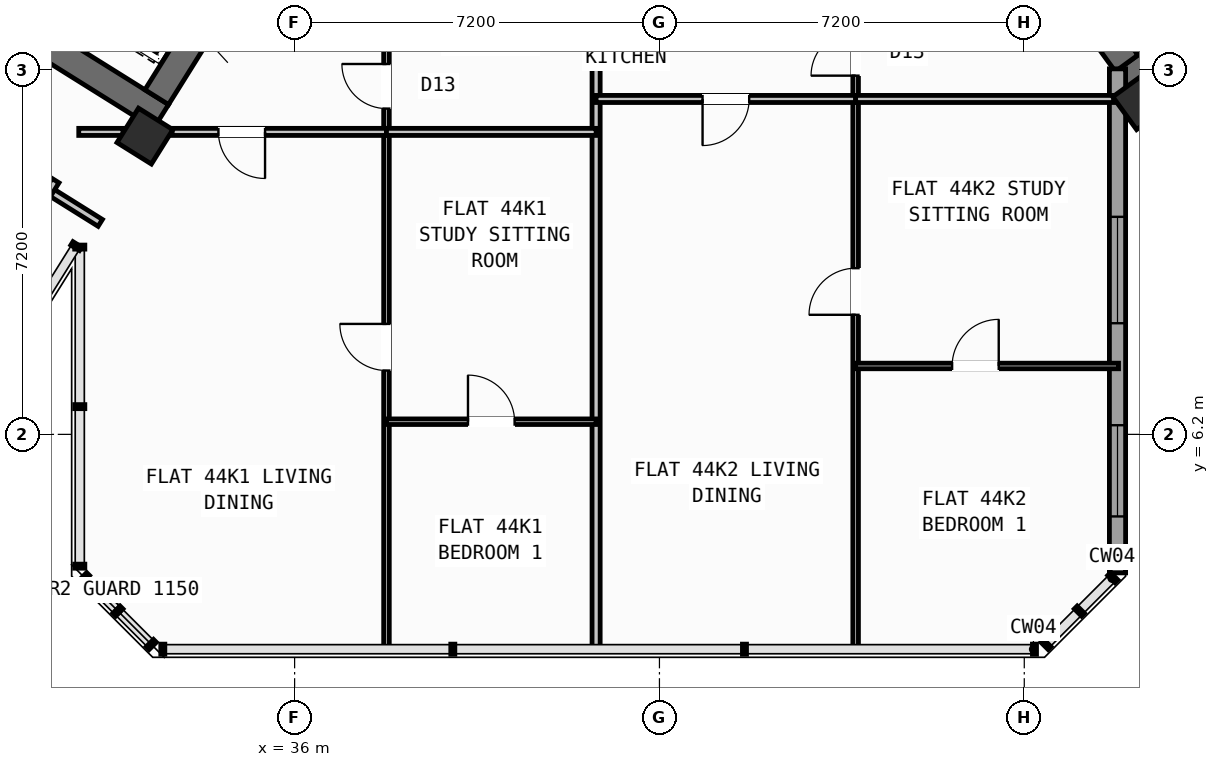
"""IFC4 building model, lengths in metres.
Left out: names, types, materials, properties, quantities, classifications, styles, units other than length and angle.
Written with IfcOpenShell. Run it as: python <this file> out.ifc"""

import sys

from ifc_helpers import new_model, si_unit, direction, frame, frame_2d, origin, origin_2d, place, context, subcontext, project, spatial, rectangle, hollow_rectangle, extrude, source, transform, mapped, element, fill, save


model = new_model("IFC4")
c1 = context("Model", 3, precision=1e-05, world=origin(), true_north=direction((0.0, 1.0)))
c2 = subcontext(c1, "Body", "Model", "MODEL_VIEW")
j1 = project(units=[si_unit("LENGTHUNIT", "METRE"), si_unit("PLANEANGLEUNIT", "RADIAN")], contexts=[c1])
p1 = place(None, origin())
s1 = spatial("IfcSite", under=j1, at=p1, CompositionType="ELEMENT")
p2 = place(p1, origin())
s2 = spatial("IfcBuilding", under=s1, at=p2, CompositionType="ELEMENT")
p3 = place(p2, frame((0.0, 0.0, 174.9)))
s3 = spatial("IfcBuildingStorey", under=s2, at=p3, CompositionType="ELEMENT", Elevation=174.9)
p4 = place(p3, frame((33.366, 12.477, 0.0), z_axis=(0.0, 0.0, 1.0), x_axis=(-0.848047359947, 0.529920442413, 0.0)))
e1 = element("IfcWall", 1, at=p4, inside=s3, PredefinedType="SHEAR", context=c2, shape_type="SweptSolid", body=[
    extrude(rectangle(XDim=13.14, YDim=0.55, at=frame_2d((6.57, 0.0))), origin(), (0.0, 0.0, 1.0), 4.22),
])
p5 = place(p3, frame((36.683, 18.304, 0.0), z_axis=(0.0, 0.0, 1.0), x_axis=(-0.529896466841, -0.848062341122, 0.0)))
e2 = element("IfcWall", 2, at=p5, inside=s3, PredefinedType="SHEAR", context=c2, shape_type="SweptSolid", body=[
    extrude(rectangle(XDim=6.425, YDim=0.55, at=frame_2d((3.212, 0.0))), origin(), (0.0, 0.0, 1.0), 4.22),
])
p6 = place(p3, frame((52.359, 13.14, 0.0), z_axis=(0.0, 0.0, 1.0), x_axis=(0.809014896919, 0.587788139183, 0.0)))
e3 = element("IfcWall", 3, at=p6, inside=s3, PredefinedType="SHEAR", context=c2, shape_type="SweptSolid", body=[
    extrude(rectangle(XDim=12.34, YDim=0.55, at=frame_2d((6.17, 0.0))), origin(), (0.0, 0.0, 1.0), 4.22),
])
p7 = place(p3, frame((52.42, 13.524, 0.0), z_axis=(0.0, 0.0, 1.0), x_axis=(-0.587802113096, 0.809004744015, 0.0)))
e4 = element("IfcWall", 4, at=p7, inside=s3, PredefinedType="SHEAR", context=c2, shape_type="SweptSolid", body=[
    extrude(rectangle(XDim=3.575, YDim=0.55, at=frame_2d((1.788, 0.0))), origin(), (0.0, 0.0, 1.0), 4.22),
])
m1 = source(origin(), c2, "Body", "SweptSolid", [
    extrude(hollow_rectangle(XDim=0.8, YDim=0.8, WallThickness=0.032, at=origin_2d()), origin(), (0.0, 0.0, 1.0), 4.5),
])
for number, where, z_axis, x_axis in (
    (5, (33.046, 12.087, 0.0), (0.0, 0.0, 1.0), (-0.848, 0.53, 0.0)),
    (6, (52.705, 12.773, 0.0), (0.0, 0.0, 1.0), (0.809, 0.588, 0.0)),
):
    element("IfcColumn", number, at=place(p3, frame(where, z_axis=z_axis, x_axis=x_axis)), inside=s3, PredefinedType="COLUMN", context=c2, shape_type="MappedRepresentation", body=[
        mapped(m1, transform((0.0, 0.0, 0.0), scale=1.0)),
    ])
p8 = place(p3, frame((56.581, 7.439, 0.0), z_axis=(0.0, 0.0, 1.0), x_axis=(-0.587771678454, 0.809026856172, 0.0)))
e7 = element("IfcWall", 7, at=p8, inside=s3, PredefinedType="STANDARD", context=c2, shape_type="SweptSolid", body=[
    extrude(rectangle(XDim=6.824, YDim=0.32, at=frame_2d((3.412, 0.0))), origin(), (0.0, 0.0, 1.0), 4.22),
])
p9 = place(p3, frame((52.24, 13.414, 0.0), z_axis=(0.0, 0.0, 1.0), x_axis=(0.0, -1.0, 0.0)))
e8 = element("IfcWall", 8, at=p9, inside=s3, PredefinedType="STANDARD", context=c2, shape_type="SweptSolid", body=[
    extrude(rectangle(XDim=9.948, YDim=0.32, at=frame_2d((4.974, 0.0))), origin(), (0.0, 0.0, 1.0), 4.22),
])
p10 = place(p9, frame((2.92, 0.0, 0.8)))
e9 = element("IfcOpeningElement", 9, at=p10, cuts=e8, PredefinedType="OPENING", context=c2, shape_type="SweptSolid", body=[
    extrude(rectangle(XDim=2.1, YDim=1.55, at=frame_2d((1.05, 0.775))), frame((0.0, 0.17, 0.0), z_axis=(0.0, -1.0, 0.0), x_axis=(1.0, 0.0, 0.0)), (0.0, 0.0, 1.0), 0.34),
])
p11 = place(p9, frame((7.033, 0.0, 0.85)))
e10 = element("IfcOpeningElement", 10, at=p11, cuts=e8, PredefinedType="OPENING", context=c2, shape_type="SweptSolid", body=[
    extrude(rectangle(XDim=1.8, YDim=1.5, at=frame_2d((0.9, 0.75))), frame((0.0, 0.17, 0.0), z_axis=(0.0, -1.0, 0.0), x_axis=(1.0, 0.0, 0.0)), (0.0, 0.0, 1.0), 0.34),
])
p12 = place(p3, frame((32.164, 10.374, 0.0), z_axis=(0.0, 0.0, 1.0), x_axis=(-0.848044107957, 0.529925646633, 0.0)))
e11 = element("IfcWall", 11, at=p12, inside=s3, PredefinedType="PARTITIONING", context=c2, shape_type="SweptSolid", body=[
    extrude(rectangle(XDim=15.57, YDim=0.16, at=frame_2d((7.785, 0.0))), origin(), (0.0, 0.0, 1.0), 4.21),
])
p13 = place(p12, frame((10.83, 0.0, 0.0)))
e12 = element("IfcOpeningElement", 12, at=p13, cuts=e11, PredefinedType="OPENING", context=c2, shape_type="SweptSolid", body=[
    extrude(rectangle(XDim=1.0, YDim=2.1, at=frame_2d((0.5, 1.05))), frame((0.0, 0.09, 0.0), z_axis=(0.0, -1.0, 0.0), x_axis=(1.0, 0.0, 0.0)), (0.0, 0.0, 1.0), 0.18),
])
p14 = place(p3, frame((31.282, 11.208, 0.0), z_axis=(0.0, 0.0, 1.0), x_axis=(-0.529938869374, -0.84803584519, 0.0)))
e13 = element("IfcWall", 13, at=p14, inside=s3, PredefinedType="PARTITIONING", context=c2, shape_type="SweptSolid", body=[
    extrude(rectangle(XDim=5.48, YDim=0.16, at=frame_2d((2.74, 0.0))), origin(), (0.0, 0.0, 1.0), 4.21),
])
p15 = place(p3, frame((41.95, 1.96, 0.0), z_axis=(0.0, 0.0, 1.0), x_axis=(0.0, 1.0, 0.0)))
e14 = element("IfcWall", 14, at=p15, inside=s3, PredefinedType="PARTITIONING", context=c2, shape_type="SweptSolid", body=[
    extrude(rectangle(XDim=13.46, YDim=0.16, at=frame_2d((6.73, 0.0))), origin(), (0.0, 0.0, 1.0), 4.21),
])
p16 = place(p3, frame((37.813, 1.96, 0.0), z_axis=(0.0, 0.0, 1.0), x_axis=(0.0, 1.0, 0.0)))
e15 = element("IfcWall", 15, at=p16, inside=s3, PredefinedType="PARTITIONING", context=c2, shape_type="SweptSolid", body=[
    extrude(rectangle(XDim=13.46, YDim=0.11, at=frame_2d((6.73, 0.0))), origin(), (0.0, 0.0, 1.0), 4.21),
])
p17 = place(p16, frame((5.5, 0.0, 0.0)))
e16 = element("IfcOpeningElement", 16, at=p17, cuts=e15, PredefinedType="OPENING", context=c2, shape_type="SweptSolid", body=[
    extrude(rectangle(XDim=0.92, YDim=2.08, at=frame_2d((0.46, 1.04))), frame((0.0, 0.065, 0.0), z_axis=(0.0, -1.0, 0.0), x_axis=(1.0, 0.0, 0.0)), (0.0, 0.0, 1.0), 0.13),
])
p18 = place(p16, frame((10.67, 0.0, 0.0)))
e17 = element("IfcOpeningElement", 17, at=p18, cuts=e15, PredefinedType="OPENING", context=c2, shape_type="SweptSolid", body=[
    extrude(rectangle(XDim=0.88, YDim=2.08, at=frame_2d((0.44, 1.04))), frame((0.0, 0.065, 0.0), z_axis=(0.0, -1.0, 0.0), x_axis=(1.0, 0.0, 0.0)), (0.0, 0.0, 1.0), 0.13),
])
p19 = place(p3, frame((31.74, 12.17, 0.0), z_axis=(0.0, 0.0, 1.0), x_axis=(1.0, 0.0, 0.0)))
e18 = element("IfcWall", 18, at=p19, inside=s3, PredefinedType="PLUMBINGWALL", context=c2, shape_type="SweptSolid", body=[
    extrude(rectangle(XDim=0.872, YDim=0.14, at=frame_2d((0.436, 0.0))), origin(), (0.0, 0.0, 1.0), 4.21),
])
p20 = place(p3, frame((33.584, 12.17, 0.0), z_axis=(0.0, 0.0, 1.0), x_axis=(1.0, 0.0, 0.0)))
e19 = element("IfcWall", 19, at=p20, inside=s3, PredefinedType="PLUMBINGWALL", context=c2, shape_type="SweptSolid", body=[
    extrude(rectangle(XDim=4.229, YDim=0.14, at=frame_2d((2.115, 0.0))), origin(), (0.0, 0.0, 1.0), 3.395),
])
p21 = place(p20, frame((0.913, 0.0, 0.0)))
e20 = element("IfcOpeningElement", 20, at=p21, cuts=e19, PredefinedType="OPENING", context=c2, shape_type="SweptSolid", body=[
    extrude(rectangle(XDim=0.92, YDim=2.08, at=frame_2d((0.46, 1.04))), frame((0.0, 0.08, 0.0), z_axis=(0.0, -1.0, 0.0), x_axis=(1.0, 0.0, 0.0)), (0.0, 0.0, 1.0), 0.16),
])
p22 = place(p3, frame((37.813, 12.17, 0.0), z_axis=(0.0, 0.0, 1.0), x_axis=(1.0, 0.0, 0.0)))
e21 = element("IfcWall", 21, at=p22, inside=s3, PredefinedType="PLUMBINGWALL", context=c2, shape_type="SweptSolid", body=[
    extrude(rectangle(XDim=4.137, YDim=0.14, at=frame_2d((2.068, 0.0))), origin(), (0.0, 0.0, 1.0), 3.395),
])
p23 = place(p3, frame((37.813, 6.45, 0.0), z_axis=(0.0, 0.0, 1.0), x_axis=(1.0, 0.0, 0.0)))
e22 = element("IfcWall", 22, at=p23, inside=s3, PredefinedType="PARTITIONING", context=c2, shape_type="SweptSolid", body=[
    extrude(rectangle(XDim=4.137, YDim=0.11, at=frame_2d((2.068, 0.0))), origin(), (0.0, 0.0, 1.0), 4.21),
])
p24 = place(p23, frame((1.608, 0.0, 0.0)))
e23 = element("IfcOpeningElement", 23, at=p24, cuts=e22, PredefinedType="OPENING", context=c2, shape_type="SweptSolid", body=[
    extrude(rectangle(XDim=0.92, YDim=2.08, at=frame_2d((0.46, 1.04))), frame((0.0, 0.065, 0.0), z_axis=(0.0, -1.0, 0.0), x_axis=(1.0, 0.0, 0.0)), (0.0, 0.0, 1.0), 0.13),
])
p25 = place(p3, frame((47.072, 1.96, 0.0), z_axis=(0.0, 0.0, 1.0), x_axis=(0.0, 1.0, 0.0)))
e24 = element("IfcWall", 24, at=p25, inside=s3, PredefinedType="PARTITIONING", context=c2, shape_type="SweptSolid", body=[
    extrude(rectangle(XDim=13.46, YDim=0.11, at=frame_2d((6.73, 0.0))), origin(), (0.0, 0.0, 1.0), 4.21),
])
p26 = place(p25, frame((6.6, 0.0, 0.0)))
e25 = element("IfcOpeningElement", 25, at=p26, cuts=e24, PredefinedType="OPENING", context=c2, shape_type="SweptSolid", body=[
    extrude(rectangle(XDim=0.92, YDim=2.08, at=frame_2d((0.46, 1.04))), frame((0.0, 0.065, 0.0), z_axis=(0.0, -1.0, 0.0), x_axis=(1.0, 0.0, 0.0)), (0.0, 0.0, 1.0), 0.13),
])
p27 = place(p25, frame((11.32, 0.0, 0.0)))
e26 = element("IfcOpeningElement", 26, at=p27, cuts=e24, PredefinedType="OPENING", context=c2, shape_type="SweptSolid", body=[
    extrude(rectangle(XDim=0.88, YDim=2.08, at=frame_2d((0.44, 1.04))), frame((0.0, 0.065, 0.0), z_axis=(0.0, -1.0, 0.0), x_axis=(1.0, 0.0, 0.0)), (0.0, 0.0, 1.0), 0.13),
])
p28 = place(p3, frame((41.95, 12.82, 0.0), z_axis=(0.0, 0.0, 1.0), x_axis=(1.0, 0.0, 0.0)))
e27 = element("IfcWall", 27, at=p28, inside=s3, PredefinedType="PLUMBINGWALL", context=c2, shape_type="SweptSolid", body=[
    extrude(rectangle(XDim=5.122, YDim=0.14, at=frame_2d((2.561, 0.0))), origin(), (0.0, 0.0, 1.0), 3.395),
])
p29 = place(p28, frame((2.101, 0.0, 0.0)))
e28 = element("IfcOpeningElement", 28, at=p29, cuts=e27, PredefinedType="OPENING", context=c2, shape_type="SweptSolid", body=[
    extrude(rectangle(XDim=0.92, YDim=2.08, at=frame_2d((0.46, 1.04))), frame((0.0, 0.08, 0.0), z_axis=(0.0, -1.0, 0.0), x_axis=(1.0, 0.0, 0.0)), (0.0, 0.0, 1.0), 0.16),
])
p30 = place(p3, frame((47.072, 12.82, 0.0), z_axis=(0.0, 0.0, 1.0), x_axis=(1.0, 0.0, 0.0)))
e29 = element("IfcWall", 29, at=p30, inside=s3, PredefinedType="PLUMBINGWALL", context=c2, shape_type="SweptSolid", body=[
    extrude(rectangle(XDim=5.09, YDim=0.14, at=frame_2d((2.545, 0.0))), origin(), (0.0, 0.0, 1.0), 3.395),
])
p31 = place(p3, frame((47.072, 7.55, 0.0), z_axis=(0.0, 0.0, 1.0), x_axis=(1.0, 0.0, 0.0)))
e30 = element("IfcWall", 30, at=p31, inside=s3, PredefinedType="PARTITIONING", context=c2, shape_type="SweptSolid", body=[
    extrude(rectangle(XDim=5.188, YDim=0.11, at=frame_2d((2.594, 0.0))), origin(), (0.0, 0.0, 1.0), 4.21),
])
p32 = place(p31, frame((1.904, 0.0, 0.0)))
e31 = element("IfcOpeningElement", 31, at=p32, cuts=e30, PredefinedType="OPENING", context=c2, shape_type="SweptSolid", body=[
    extrude(rectangle(XDim=0.92, YDim=2.08, at=frame_2d((0.46, 1.04))), frame((0.0, 0.065, 0.0), z_axis=(0.0, -1.0, 0.0), x_axis=(1.0, 0.0, 0.0)), (0.0, 0.0, 1.0), 0.13),
])
m2 = source(origin(), c2, "Body", "SweptSolid", [
    extrude(rectangle(XDim=2.1, YDim=1.55, at=frame_2d((1.05, 0.775))), frame((0.0, 0.03, 0.0), z_axis=(0.0, -1.0, 0.0), x_axis=(1.0, 0.0, 0.0)), (0.0, 0.0, 1.0), 0.06),
])
p33 = place(p10, origin())
e32 = element("IfcWindow", 32, at=p33, inside=s3, PartitioningType="SINGLE_PANEL", PredefinedType="WINDOW", context=c2, shape_type="MappedRepresentation", body=[
    mapped(m2, transform((0.0, 0.0, 0.0), scale=1.0)),
])
fill(e9, e32)
m3 = source(origin(), c2, "Body", "SweptSolid", [
    extrude(rectangle(XDim=1.8, YDim=1.5, at=frame_2d((0.9, 0.75))), frame((0.0, 0.03, 0.0), z_axis=(0.0, -1.0, 0.0), x_axis=(1.0, 0.0, 0.0)), (0.0, 0.0, 1.0), 0.06),
])
p34 = place(p11, origin())
e33 = element("IfcWindow", 33, at=p34, inside=s3, PartitioningType="SINGLE_PANEL", PredefinedType="WINDOW", context=c2, shape_type="MappedRepresentation", body=[
    mapped(m3, transform((0.0, 0.0, 0.0), scale=1.0)),
])
fill(e10, e33)
m4 = source(origin(), c2, "Body", "SweptSolid", [
    extrude(rectangle(XDim=0.92, YDim=2.08, at=frame_2d((0.46, 1.04))), frame((0.0, 0.025, 0.0), z_axis=(0.0, -1.0, 0.0), x_axis=(1.0, 0.0, 0.0)), (0.0, 0.0, 1.0), 0.05),
])
p35 = place(p17, origin())
e34 = element("IfcDoor", 34, at=p35, inside=s3, OperationType="SINGLE_SWING_RIGHT", PredefinedType="DOOR", context=c2, shape_type="MappedRepresentation", body=[
    mapped(m4, transform((0.0, 0.0, 0.0), scale=1.0)),
])
fill(e16, e34)
p36 = place(p24, origin())
e35 = element("IfcDoor", 35, at=p36, inside=s3, OperationType="SINGLE_SWING_LEFT", PredefinedType="DOOR", context=c2, shape_type="MappedRepresentation", body=[
    mapped(m4, transform((0.0, 0.0, 0.0), scale=1.0)),
])
fill(e23, e35)
p37 = place(p21, frame((0.92, 0.0, 0.0), z_axis=(0.0, 0.0, 1.0), x_axis=(-1.0, 0.0, 0.0)))
e36 = element("IfcDoor", 36, at=p37, inside=s3, OperationType="SINGLE_SWING_LEFT", PredefinedType="DOOR", context=c2, shape_type="MappedRepresentation", body=[
    mapped(m4, transform((0.0, 0.0, 0.0), scale=1.0)),
])
fill(e20, e36)
m5 = source(origin(), c2, "Body", "SweptSolid", [
    extrude(rectangle(XDim=0.88, YDim=2.08, at=frame_2d((0.44, 1.04))), frame((0.0, 0.025, 0.0), z_axis=(0.0, -1.0, 0.0), x_axis=(1.0, 0.0, 0.0)), (0.0, 0.0, 1.0), 0.05),
])
p38 = place(p18, origin())
e37 = element("IfcDoor", 37, at=p38, inside=s3, OperationType="SINGLE_SWING_RIGHT", PredefinedType="DOOR", context=c2, shape_type="MappedRepresentation", body=[
    mapped(m5, transform((0.0, 0.0, 0.0), scale=1.0)),
])
fill(e17, e37)
p39 = place(p26, origin())
e38 = element("IfcDoor", 38, at=p39, inside=s3, OperationType="SINGLE_SWING_LEFT", PredefinedType="DOOR", context=c2, shape_type="MappedRepresentation", body=[
    mapped(m4, transform((0.0, 0.0, 0.0), scale=1.0)),
])
fill(e25, e38)
p40 = place(p32, origin())
e39 = element("IfcDoor", 39, at=p40, inside=s3, OperationType="SINGLE_SWING_RIGHT", PredefinedType="DOOR", context=c2, shape_type="MappedRepresentation", body=[
    mapped(m4, transform((0.0, 0.0, 0.0), scale=1.0)),
])
fill(e31, e39)
p41 = place(p29, frame((0.92, 0.0, 0.0), z_axis=(0.0, 0.0, 1.0), x_axis=(-1.0, 0.0, 0.0)))
e40 = element("IfcDoor", 40, at=p41, inside=s3, OperationType="SINGLE_SWING_RIGHT", PredefinedType="DOOR", context=c2, shape_type="MappedRepresentation", body=[
    mapped(m4, transform((0.0, 0.0, 0.0), scale=1.0)),
])
fill(e28, e40)
p42 = place(p27, origin())
e41 = element("IfcDoor", 41, at=p42, inside=s3, OperationType="SINGLE_SWING_LEFT", PredefinedType="DOOR", context=c2, shape_type="MappedRepresentation", body=[
    mapped(m5, transform((0.0, 0.0, 0.0), scale=1.0)),
])
fill(e26, e41)
save(model, sys.argv[1])
